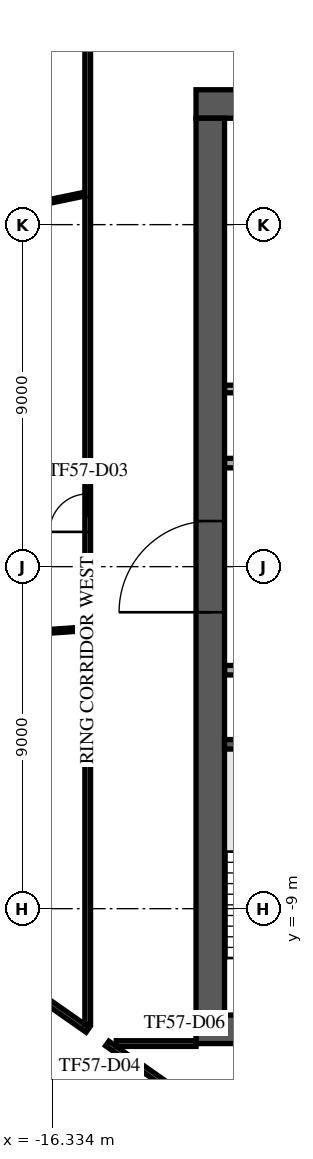
"""IFC4 building model, lengths in metres.
Left out: names, types, materials, properties, quantities, classifications, styles, units other than length and angle.
Written with IfcOpenShell. Run it as: python <this file> out.ifc"""

import sys

from ifc_helpers import new_model, si_unit, direction, frame, frame_2d, origin, place, context, subcontext, project, spatial, rectangle, extrude, element, fill, save


model = new_model("IFC4")
c1 = context("Model", 3, precision=1e-05, world=origin(), true_north=direction((0.0, 1.0)))
c2 = subcontext(c1, "Body", "Model", "MODEL_VIEW")
j1 = project(units=[si_unit("LENGTHUNIT", "METRE"), si_unit("PLANEANGLEUNIT", "RADIAN")], contexts=[c1])
p1 = place(None, origin())
s1 = spatial("IfcSite", under=j1, at=p1, CompositionType="ELEMENT")
p2 = place(p1, origin())
s2 = spatial("IfcBuilding", under=s1, at=p2, CompositionType="ELEMENT")
p3 = place(p2, frame((0.0, 0.0, 242.9)))
s3 = spatial("IfcBuildingStorey", under=s2, at=p3, CompositionType="ELEMENT", Elevation=242.9)
p4 = place(p3, frame((-12.55, 12.175, 0.0), z_axis=(0.0, 0.0, 1.0), x_axis=(1.0, 0.0, 0.0)))
e1 = element("IfcWall", 1, at=p4, inside=s3, PredefinedType="SHEAR", context=c2, shape_type="SweptSolid", body=[
    extrude(rectangle(XDim=25.1, YDim=0.75, at=frame_2d((12.55, 0.0))), origin(), (0.0, 0.0, 1.0), 3.64),
])
p5 = place(p4, frame((11.35, 0.0, 0.0)))
e2 = element("IfcOpeningElement", 2, at=p5, cuts=e1, PredefinedType="OPENING", context=c2, shape_type="SweptSolid", body=[
    extrude(rectangle(XDim=2.4, YDim=2.4, at=frame_2d((1.2, 1.2))), frame((0.0, 0.385, 0.0), z_axis=(0.0, -1.0, 0.0), x_axis=(1.0, 0.0, 0.0)), (0.0, 0.0, 1.0), 0.77),
])
p6 = place(p4, frame((22.175, 0.0, 0.0)))
e3 = element("IfcOpeningElement", 3, at=p6, cuts=e1, PredefinedType="OPENING", context=c2, shape_type="SweptSolid", body=[
    extrude(rectangle(XDim=1.2, YDim=2.1, at=frame_2d((0.6, 1.05))), frame((0.0, 0.385, 0.0), z_axis=(0.0, -1.0, 0.0), x_axis=(1.0, 0.0, 0.0)), (0.0, 0.0, 1.0), 0.77),
])
p7 = place(p4, frame((1.15, 0.0, 0.0)))
e4 = element("IfcOpeningElement", 4, at=p7, cuts=e1, PredefinedType="OPENING", context=c2, shape_type="SweptSolid", body=[
    extrude(rectangle(XDim=1.0, YDim=2.1, at=frame_2d((0.5, 1.05))), frame((0.0, 0.385, 0.0), z_axis=(0.0, -1.0, 0.0), x_axis=(1.0, 0.0, 0.0)), (0.0, 0.0, 1.0), 0.77),
])
p8 = place(p3, frame((-12.55, -12.175, 0.0), z_axis=(0.0, 0.0, 1.0), x_axis=(1.0, 0.0, 0.0)))
e5 = element("IfcWall", 5, at=p8, inside=s3, PredefinedType="SHEAR", context=c2, shape_type="SweptSolid", body=[
    extrude(rectangle(XDim=25.1, YDim=0.75, at=frame_2d((12.55, 0.0))), origin(), (0.0, 0.0, 1.0), 3.64),
])
p9 = place(p8, frame((7.45, 0.0, 0.0)))
e6 = element("IfcOpeningElement", 6, at=p9, cuts=e5, PredefinedType="OPENING", context=c2, shape_type="SweptSolid", body=[
    extrude(rectangle(XDim=2.0, YDim=2.1, at=frame_2d((1.0, 1.05))), frame((0.0, 0.385, 0.0), z_axis=(0.0, -1.0, 0.0), x_axis=(1.0, 0.0, 0.0)), (0.0, 0.0, 1.0), 0.77),
])
p10 = place(p8, frame((17.575, 0.0, 0.0)))
e7 = element("IfcOpeningElement", 7, at=p10, cuts=e5, PredefinedType="OPENING", context=c2, shape_type="SweptSolid", body=[
    extrude(rectangle(XDim=1.2, YDim=2.1, at=frame_2d((0.6, 1.05))), frame((0.0, 0.385, 0.0), z_axis=(0.0, -1.0, 0.0), x_axis=(1.0, 0.0, 0.0)), (0.0, 0.0, 1.0), 0.77),
])
p11 = place(p8, frame((1.725, 0.0, 0.0)))
e8 = element("IfcOpeningElement", 8, at=p11, cuts=e5, PredefinedType="OPENING", context=c2, shape_type="SweptSolid", body=[
    extrude(rectangle(XDim=1.2, YDim=2.1, at=frame_2d((0.6, 1.05))), frame((0.0, 0.385, 0.0), z_axis=(0.0, -1.0, 0.0), x_axis=(1.0, 0.0, 0.0)), (0.0, 0.0, 1.0), 0.77),
])
p12 = place(p8, frame((22.175, 0.0, 0.0)))
e9 = element("IfcOpeningElement", 9, at=p12, cuts=e5, PredefinedType="OPENING", context=c2, shape_type="SweptSolid", body=[
    extrude(rectangle(XDim=1.2, YDim=2.1, at=frame_2d((0.6, 1.05))), frame((0.0, 0.385, 0.0), z_axis=(0.0, -1.0, 0.0), x_axis=(1.0, 0.0, 0.0)), (0.0, 0.0, 1.0), 0.77),
])
p13 = place(p3, frame((-12.175, -11.8, 0.0), z_axis=(0.0, 0.0, 1.0), x_axis=(0.0, 1.0, 0.0)))
e10 = element("IfcWall", 10, at=p13, inside=s3, PredefinedType="SHEAR", context=c2, shape_type="SweptSolid", body=[
    extrude(rectangle(XDim=23.6, YDim=0.75, at=frame_2d((11.8, 0.0))), origin(), (0.0, 0.0, 1.0), 3.64),
])
p14 = place(p13, frame((10.6, 0.0, 0.0)))
e11 = element("IfcOpeningElement", 11, at=p14, cuts=e10, PredefinedType="OPENING", context=c2, shape_type="SweptSolid", body=[
    extrude(rectangle(XDim=2.4, YDim=2.4, at=frame_2d((1.2, 1.2))), frame((0.0, 0.385, 0.0), z_axis=(0.0, -1.0, 0.0), x_axis=(1.0, 0.0, 0.0)), (0.0, 0.0, 1.0), 0.77),
])
p15 = place(p3, frame((-8.65, -4.675, 0.0), z_axis=(0.0, 0.0, 1.0), x_axis=(-1.0, 0.0, 0.0)))
e12 = element("IfcWall", 12, at=p15, inside=s3, PredefinedType="SOLIDWALL", context=c2, shape_type="SweptSolid", body=[
    extrude(rectangle(XDim=3.15, YDim=0.25, at=frame_2d((1.575, 0.0))), origin(), (0.0, 0.0, 1.0), 3.64),
])
p16 = place(p3, frame((-11.795, -2.725, 0.0), z_axis=(0.0, 0.0, 1.0), x_axis=(1.0, 0.0, 0.0)))
e13 = element("IfcWall", 13, at=p16, inside=s3, PredefinedType="PARTITIONING", context=c2, shape_type="SweptSolid", body=[
    extrude(rectangle(XDim=14.415, YDim=0.25, at=frame_2d((7.208, 0.0))), origin(), (0.0, 0.0, 1.0), 3.64),
])
p17 = place(p16, frame((1.295, 0.0, 0.0)))
e14 = element("IfcOpeningElement", 14, at=p17, cuts=e13, PredefinedType="OPENING", context=c2, shape_type="SweptSolid", body=[
    extrude(rectangle(XDim=1.0, YDim=2.1, at=frame_2d((0.5, 1.05))), frame((0.0, 0.135, 0.0), z_axis=(0.0, -1.0, 0.0), x_axis=(1.0, 0.0, 0.0)), (0.0, 0.0, 1.0), 0.27),
])
p18 = place(p16, frame((4.42, 0.0, 0.0)))
e15 = element("IfcOpeningElement", 15, at=p18, cuts=e13, PredefinedType="OPENING", context=c2, shape_type="SweptSolid", body=[
    extrude(rectangle(XDim=1.0, YDim=2.1, at=frame_2d((0.5, 1.05))), frame((0.0, 0.135, 0.0), z_axis=(0.0, -1.0, 0.0), x_axis=(1.0, 0.0, 0.0)), (0.0, 0.0, 1.0), 0.27),
])
p19 = place(p16, frame((9.92, 0.0, 0.0)))
e16 = element("IfcOpeningElement", 16, at=p19, cuts=e13, PredefinedType="OPENING", context=c2, shape_type="SweptSolid", body=[
    extrude(rectangle(XDim=1.0, YDim=2.1, at=frame_2d((0.5, 1.05))), frame((0.0, 0.135, 0.0), z_axis=(0.0, -1.0, 0.0), x_axis=(1.0, 0.0, 0.0)), (0.0, 0.0, 1.0), 0.27),
])
p20 = place(p3, frame((-11.795, 2.725, 0.0), z_axis=(0.0, 0.0, 1.0), x_axis=(1.0, 0.0, 0.0)))
e17 = element("IfcWall", 17, at=p20, inside=s3, PredefinedType="PARTITIONING", context=c2, shape_type="SweptSolid", body=[
    extrude(rectangle(XDim=23.59, YDim=0.25, at=frame_2d((11.795, 0.0))), origin(), (0.0, 0.0, 1.0), 3.64),
])
p21 = place(p20, frame((21.345, 0.0, 0.0)))
e18 = element("IfcOpeningElement", 18, at=p21, cuts=e17, PredefinedType="OPENING", context=c2, shape_type="SweptSolid", body=[
    extrude(rectangle(XDim=0.9, YDim=2.1, at=frame_2d((0.45, 1.05))), frame((0.0, 0.135, 0.0), z_axis=(0.0, -1.0, 0.0), x_axis=(1.0, 0.0, 0.0)), (0.0, 0.0, 1.0), 0.27),
])
p22 = place(p20, frame((1.345, 0.0, 0.0)))
e19 = element("IfcOpeningElement", 19, at=p22, cuts=e17, PredefinedType="OPENING", context=c2, shape_type="SweptSolid", body=[
    extrude(rectangle(XDim=0.9, YDim=2.1, at=frame_2d((0.45, 1.05))), frame((0.0, 0.135, 0.0), z_axis=(0.0, -1.0, 0.0), x_axis=(1.0, 0.0, 0.0)), (0.0, 0.0, 1.0), 0.27),
])
p23 = place(p20, frame((4.42, 0.0, 0.0)))
e20 = element("IfcOpeningElement", 20, at=p23, cuts=e17, PredefinedType="OPENING", context=c2, shape_type="SweptSolid", body=[
    extrude(rectangle(XDim=1.0, YDim=2.1, at=frame_2d((0.5, 1.05))), frame((0.0, 0.135, 0.0), z_axis=(0.0, -1.0, 0.0), x_axis=(1.0, 0.0, 0.0)), (0.0, 0.0, 1.0), 0.27),
])
p24 = place(p20, frame((7.17, 0.0, 0.0)))
e21 = element("IfcOpeningElement", 21, at=p24, cuts=e17, PredefinedType="OPENING", context=c2, shape_type="SweptSolid", body=[
    extrude(rectangle(XDim=1.0, YDim=2.1, at=frame_2d((0.5, 1.05))), frame((0.0, 0.135, 0.0), z_axis=(0.0, -1.0, 0.0), x_axis=(1.0, 0.0, 0.0)), (0.0, 0.0, 1.0), 0.27),
])
p25 = place(p20, frame((12.57, 0.0, 0.0)))
e22 = element("IfcOpeningElement", 22, at=p25, cuts=e17, PredefinedType="OPENING", context=c2, shape_type="SweptSolid", body=[
    extrude(rectangle(XDim=1.2, YDim=2.1, at=frame_2d((0.6, 1.05))), frame((0.0, 0.135, 0.0), z_axis=(0.0, -1.0, 0.0), x_axis=(1.0, 0.0, 0.0)), (0.0, 0.0, 1.0), 0.27),
])
p26 = place(p3, frame((-11.795, 4.675, 0.0), z_axis=(0.0, 0.0, 1.0), x_axis=(1.0, 0.0, 0.0)))
e23 = element("IfcWall", 23, at=p26, inside=s3, PredefinedType="PARTITIONING", context=c2, shape_type="SweptSolid", body=[
    extrude(rectangle(XDim=3.645, YDim=0.2, at=frame_2d((1.823, 0.0))), origin(), (0.0, 0.0, 1.0), 3.64),
])
p27 = place(p3, frame((-5.115, 33.491, 0.0), z_axis=(0.0, 0.0, 1.0), x_axis=(-0.57357740375, -0.819151366908, 0.0)))
e24 = element("IfcWall", 24, at=p27, inside=s3, PredefinedType="STANDARD", context=c2, shape_type="SweptSolid", body=[
    extrude(rectangle(XDim=48.843, YDim=0.6, at=frame_2d((24.422, 0.0))), origin(), (0.0, 0.0, 1.0), 3.64),
])
p28 = place(p27, frame((1.22, 0.0, 0.9)))
e25 = element("IfcOpeningElement", 25, at=p28, cuts=e24, PredefinedType="OPENING", context=c2, shape_type="SweptSolid", body=[
    extrude(rectangle(XDim=2.0, YDim=2.1, at=frame_2d((1.0, 1.05))), frame((0.0, 0.31, 0.0), z_axis=(0.0, -1.0, 0.0), x_axis=(1.0, 0.0, 0.0)), (0.0, 0.0, 1.0), 0.62),
])
p29 = place(p27, frame((5.66, 0.0, 0.9)))
e26 = element("IfcOpeningElement", 26, at=p29, cuts=e24, PredefinedType="OPENING", context=c2, shape_type="SweptSolid", body=[
    extrude(rectangle(XDim=2.0, YDim=2.1, at=frame_2d((1.0, 1.05))), frame((0.0, 0.31, 0.0), z_axis=(0.0, -1.0, 0.0), x_axis=(1.0, 0.0, 0.0)), (0.0, 0.0, 1.0), 0.62),
])
p30 = place(p27, frame((10.101, 0.0, 0.9)))
e27 = element("IfcOpeningElement", 27, at=p30, cuts=e24, PredefinedType="OPENING", context=c2, shape_type="SweptSolid", body=[
    extrude(rectangle(XDim=2.0, YDim=2.1, at=frame_2d((1.0, 1.05))), frame((0.0, 0.31, 0.0), z_axis=(0.0, -1.0, 0.0), x_axis=(1.0, 0.0, 0.0)), (0.0, 0.0, 1.0), 0.62),
])
p31 = place(p27, frame((14.541, 0.0, 0.9)))
e28 = element("IfcOpeningElement", 28, at=p31, cuts=e24, PredefinedType="OPENING", context=c2, shape_type="SweptSolid", body=[
    extrude(rectangle(XDim=2.0, YDim=2.1, at=frame_2d((1.0, 1.05))), frame((0.0, 0.31, 0.0), z_axis=(0.0, -1.0, 0.0), x_axis=(1.0, 0.0, 0.0)), (0.0, 0.0, 1.0), 0.62),
])
p32 = place(p27, frame((18.981, 0.0, 0.9)))
e29 = element("IfcOpeningElement", 29, at=p32, cuts=e24, PredefinedType="OPENING", context=c2, shape_type="SweptSolid", body=[
    extrude(rectangle(XDim=2.0, YDim=2.1, at=frame_2d((1.0, 1.05))), frame((0.0, 0.31, 0.0), z_axis=(0.0, -1.0, 0.0), x_axis=(1.0, 0.0, 0.0)), (0.0, 0.0, 1.0), 0.62),
])
p33 = place(p27, frame((23.422, 0.0, 0.9)))
e30 = element("IfcOpeningElement", 30, at=p33, cuts=e24, PredefinedType="OPENING", context=c2, shape_type="SweptSolid", body=[
    extrude(rectangle(XDim=2.0, YDim=2.1, at=frame_2d((1.0, 1.05))), frame((0.0, 0.31, 0.0), z_axis=(0.0, -1.0, 0.0), x_axis=(1.0, 0.0, 0.0)), (0.0, 0.0, 1.0), 0.62),
])
p34 = place(p27, frame((27.862, 0.0, 0.9)))
e31 = element("IfcOpeningElement", 31, at=p34, cuts=e24, PredefinedType="OPENING", context=c2, shape_type="SweptSolid", body=[
    extrude(rectangle(XDim=2.0, YDim=2.1, at=frame_2d((1.0, 1.05))), frame((0.0, 0.31, 0.0), z_axis=(0.0, -1.0, 0.0), x_axis=(1.0, 0.0, 0.0)), (0.0, 0.0, 1.0), 0.62),
])
p35 = place(p27, frame((32.302, 0.0, 0.9)))
e32 = element("IfcOpeningElement", 32, at=p35, cuts=e24, PredefinedType="OPENING", context=c2, shape_type="SweptSolid", body=[
    extrude(rectangle(XDim=2.0, YDim=2.1, at=frame_2d((1.0, 1.05))), frame((0.0, 0.31, 0.0), z_axis=(0.0, -1.0, 0.0), x_axis=(1.0, 0.0, 0.0)), (0.0, 0.0, 1.0), 0.62),
])
p36 = place(p27, frame((36.742, 0.0, 0.9)))
e33 = element("IfcOpeningElement", 33, at=p36, cuts=e24, PredefinedType="OPENING", context=c2, shape_type="SweptSolid", body=[
    extrude(rectangle(XDim=2.0, YDim=2.1, at=frame_2d((1.0, 1.05))), frame((0.0, 0.31, 0.0), z_axis=(0.0, -1.0, 0.0), x_axis=(1.0, 0.0, 0.0)), (0.0, 0.0, 1.0), 0.62),
])
p37 = place(p27, frame((41.183, 0.0, 0.9)))
e34 = element("IfcOpeningElement", 34, at=p37, cuts=e24, PredefinedType="OPENING", context=c2, shape_type="SweptSolid", body=[
    extrude(rectangle(XDim=2.0, YDim=2.1, at=frame_2d((1.0, 1.05))), frame((0.0, 0.31, 0.0), z_axis=(0.0, -1.0, 0.0), x_axis=(1.0, 0.0, 0.0)), (0.0, 0.0, 1.0), 0.62),
])
p38 = place(p27, frame((45.623, 0.0, 0.9)))
e35 = element("IfcOpeningElement", 35, at=p38, cuts=e24, PredefinedType="OPENING", context=c2, shape_type="SweptSolid", body=[
    extrude(rectangle(XDim=2.0, YDim=2.1, at=frame_2d((1.0, 1.05))), frame((0.0, 0.31, 0.0), z_axis=(0.0, -1.0, 0.0), x_axis=(1.0, 0.0, 0.0)), (0.0, 0.0, 1.0), 0.62),
])
p39 = place(p3, frame((-26.231, -7.537, 0.0), z_axis=(0.0, 0.0, 1.0), x_axis=(0.819166569978, -0.573555690959, 0.0)))
e36 = element("IfcWall", 36, at=p39, inside=s3, PredefinedType="PARTITIONING", context=c2, shape_type="SweptSolid", body=[
    extrude(rectangle(XDim=34.403, YDim=0.15, at=frame_2d((17.201, 0.0))), origin(), (0.0, 0.0, 1.0), 3.24),
])
p40 = place(p39, frame((3.05, 0.0, 0.0)))
e37 = element("IfcOpeningElement", 37, at=p40, cuts=e36, PredefinedType="OPENING", context=c2, shape_type="SweptSolid", body=[
    extrude(rectangle(XDim=1.8, YDim=2.1, at=frame_2d((0.9, 1.05))), frame((0.0, 0.085, 0.0), z_axis=(0.0, -1.0, 0.0), x_axis=(1.0, 0.0, 0.0)), (0.0, 0.0, 1.0), 0.17),
])
p41 = place(p39, frame((13.103, 0.0, 0.0)))
e38 = element("IfcOpeningElement", 38, at=p41, cuts=e36, PredefinedType="OPENING", context=c2, shape_type="SweptSolid", body=[
    extrude(rectangle(XDim=1.0, YDim=2.1, at=frame_2d((0.5, 1.05))), frame((0.0, 0.085, 0.0), z_axis=(0.0, -1.0, 0.0), x_axis=(1.0, 0.0, 0.0)), (0.0, 0.0, 1.0), 0.17),
])
p42 = place(p39, frame((19.173, 0.0, 0.0)))
e39 = element("IfcOpeningElement", 39, at=p42, cuts=e36, PredefinedType="OPENING", context=c2, shape_type="SweptSolid", body=[
    extrude(rectangle(XDim=1.0, YDim=2.1, at=frame_2d((0.5, 1.05))), frame((0.0, 0.085, 0.0), z_axis=(0.0, -1.0, 0.0), x_axis=(1.0, 0.0, 0.0)), (0.0, 0.0, 1.0), 0.17),
])
p43 = place(p3, frame((-24.854, -5.571, 0.0), z_axis=(0.0, 0.0, 1.0), x_axis=(0.819176259714, -0.573541851586, 0.0)))
e40 = element("IfcWall", 40, at=p43, inside=s3, PredefinedType="PARTITIONING", context=c2, shape_type="SweptSolid", body=[
    extrude(rectangle(XDim=11.54, YDim=0.15, at=frame_2d((5.77, 0.0))), origin(), (0.0, 0.0, 1.0), 3.24),
])
p44 = place(p43, frame((6.8, 0.0, 0.0)))
e41 = element("IfcOpeningElement", 41, at=p44, cuts=e40, PredefinedType="OPENING", context=c2, shape_type="SweptSolid", body=[
    extrude(rectangle(XDim=1.0, YDim=2.1, at=frame_2d((0.5, 1.05))), frame((0.0, 0.085, 0.0), z_axis=(0.0, -1.0, 0.0), x_axis=(1.0, 0.0, 0.0)), (0.0, 0.0, 1.0), 0.17),
])
p45 = place(p3, frame((-15.4, -12.046, 0.0), z_axis=(0.0, 0.0, 1.0), x_axis=(0.0, 1.0, 0.0)))
e42 = element("IfcWall", 42, at=p45, inside=s3, PredefinedType="PARTITIONING", context=c2, shape_type="SweptSolid", body=[
    extrude(rectangle(XDim=27.446, YDim=0.15, at=frame_2d((13.723, 0.0))), origin(), (0.0, 0.0, 1.0), 3.24),
])
p46 = place(p45, frame((12.961, 0.0, 0.0)))
e43 = element("IfcOpeningElement", 43, at=p46, cuts=e42, PredefinedType="OPENING", context=c2, shape_type="SweptSolid", body=[
    extrude(rectangle(XDim=1.0, YDim=2.1, at=frame_2d((0.5, 1.05))), frame((0.0, 0.085, 0.0), z_axis=(0.0, -1.0, 0.0), x_axis=(1.0, 0.0, 0.0)), (0.0, 0.0, 1.0), 0.17),
])
p47 = place(p3, frame((-14.886, -12.55, 0.0), z_axis=(0.0, 0.0, 1.0), x_axis=(0.819131763787, -0.57360539882, 0.0)))
e44 = element("IfcWall", 44, at=p47, inside=s3, PredefinedType="PARTITIONING", context=c2, shape_type="SweptSolid", body=[
    extrude(rectangle(XDim=7.559, YDim=0.15, at=frame_2d((3.78, 0.0))), origin(), (0.0, 0.0, 1.0), 3.24),
])
p48 = place(p47, frame((4.3, 0.0, 0.0)))
e45 = element("IfcOpeningElement", 45, at=p48, cuts=e44, PredefinedType="OPENING", context=c2, shape_type="SweptSolid", body=[
    extrude(rectangle(XDim=1.0, YDim=2.1, at=frame_2d((0.5, 1.05))), frame((0.0, 0.085, 0.0), z_axis=(0.0, -1.0, 0.0), x_axis=(1.0, 0.0, 0.0)), (0.0, 0.0, 1.0), 0.17),
])
p49 = place(p3, frame((-14.648, -12.55, 0.0), z_axis=(0.0, 0.0, 1.0), x_axis=(1.0, 0.0, 0.0)))
e46 = element("IfcWall", 46, at=p49, inside=s3, PredefinedType="PARTITIONING", context=c2, shape_type="SweptSolid", body=[
    extrude(rectangle(XDim=2.098, YDim=0.15, at=frame_2d((1.049, 0.0))), origin(), (0.0, 0.0, 1.0), 3.24),
])
p50 = place(p3, frame((-30.057, -2.656, 0.0), z_axis=(0.0, 0.0, 1.0), x_axis=(0.99756824466, 0.069696465096, 0.0)))
e47 = element("IfcWall", 47, at=p50, inside=s3, PredefinedType="PARTITIONING", context=c2, shape_type="SweptSolid", body=[
    extrude(rectangle(XDim=14.614, YDim=0.1, at=frame_2d((7.307, 0.0))), origin(), (0.0, 0.0, 1.0), 3.64),
])
p51 = place(p3, frame((-22.331, 8.378, 0.0), z_axis=(0.0, 0.0, 1.0), x_axis=(0.97903673151, 0.203683770474, 0.0)))
e48 = element("IfcWall", 48, at=p51, inside=s3, PredefinedType="PARTITIONING", context=c2, shape_type="SweptSolid", body=[
    extrude(rectangle(XDim=6.993, YDim=0.1, at=frame_2d((3.496, 0.0))), origin(), (0.0, 0.0, 1.0), 3.64),
])
p52 = place(p14, origin())
e49 = element("IfcDoor", 49, at=p52, inside=s3, OperationType="SINGLE_SWING_LEFT", PredefinedType="DOOR", context=c2, shape_type="SweptSolid", body=[
    extrude(rectangle(XDim=2.4, YDim=2.4, at=frame_2d((1.2, 1.2))), frame((0.0, 0.025, 0.0), z_axis=(0.0, -1.0, 0.0), x_axis=(1.0, 0.0, 0.0)), (0.0, 0.0, 1.0), 0.05),
])
fill(e11, e49)
p53 = place(p46, origin())
e50 = element("IfcDoor", 50, at=p53, inside=s3, OperationType="SINGLE_SWING_LEFT", PredefinedType="DOOR", context=c2, shape_type="SweptSolid", body=[
    extrude(rectangle(XDim=1.0, YDim=2.1, at=frame_2d((0.5, 1.05))), frame((0.0, 0.025, 0.0), z_axis=(0.0, -1.0, 0.0), x_axis=(1.0, 0.0, 0.0)), (0.0, 0.0, 1.0), 0.05),
])
fill(e43, e50)
save(model, sys.argv[1])
